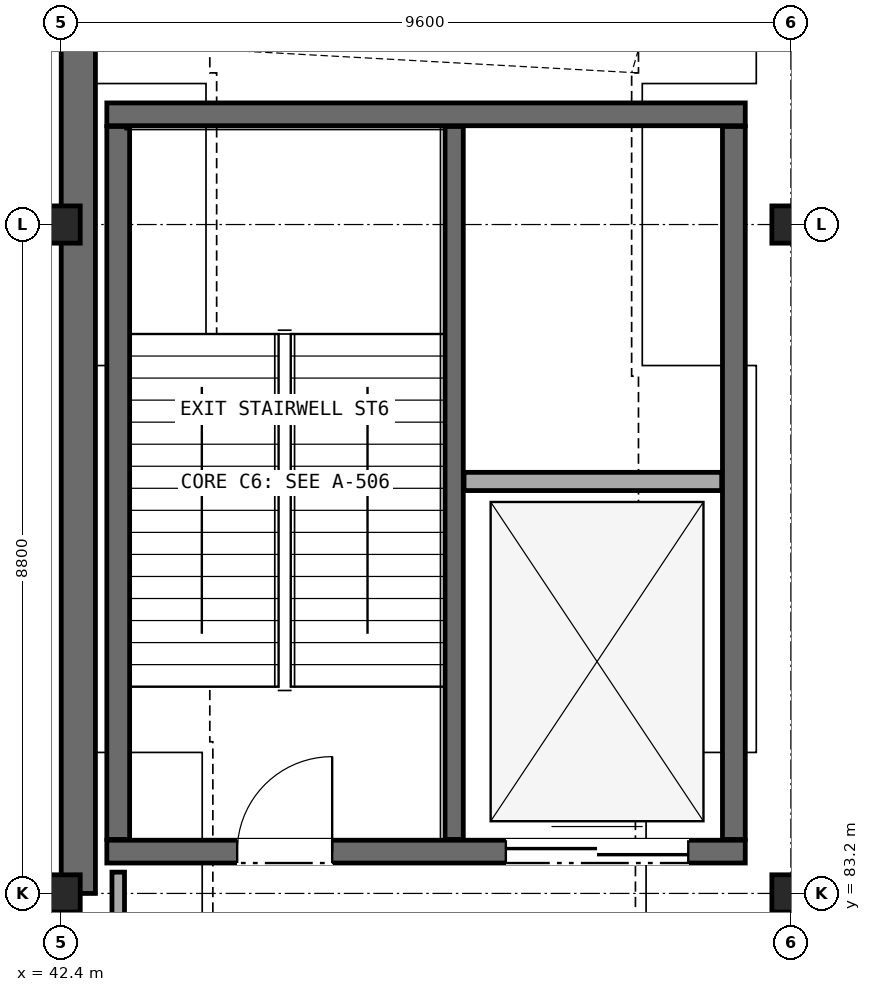
"""IFC4 building model, lengths in metres.
Left out: names, types, materials, properties, quantities, classifications, styles, units other than length and angle.
Written with IfcOpenShell. Run it as: python <this file> out.ifc"""

import sys

from ifc_helpers import new_model, si_unit, direction, frame, frame_2d, origin, origin_2d, place, context, subcontext, project, spatial, rectangle, i_section, extrude, element, fill, save


model = new_model("IFC4")
c1 = context("Model", 3, precision=1e-05, world=origin(), true_north=direction((0.0, 1.0)))
c2 = subcontext(c1, "Body", "Model", "MODEL_VIEW")
j1 = project(units=[si_unit("LENGTHUNIT", "METRE"), si_unit("PLANEANGLEUNIT", "RADIAN")], contexts=[c1])
p1 = place(None, origin())
s1 = spatial("IfcSite", under=j1, at=p1, CompositionType="ELEMENT")
p2 = place(p1, origin())
s2 = spatial("IfcBuilding", under=s1, at=p2, CompositionType="ELEMENT")
p3 = place(p2, frame((0.0, 0.0, -5.4)))
s3 = spatial("IfcBuildingStorey", under=s2, at=p3, CompositionType="ELEMENT", Elevation=-5.4)
for number, where, z_axis, x_axis in (
    (1, (42.4, 83.2, 0.0), (0.0, 0.0, 1.0), (1.0, 0.0, 0.0)),
    (2, (42.4, 92.0, 0.0), (0.0, 0.0, 1.0), (1.0, 0.0, 0.0)),
    (3, (52.0, 83.2, 0.0), (0.0, 0.0, 1.0), (1.0, 0.0, 0.0)),
    (4, (52.0, 92.0, 0.0), (0.0, 0.0, 1.0), (1.0, 0.0, 0.0)),
):
    element("IfcColumn", number, at=place(p3, frame(where, z_axis=z_axis, x_axis=x_axis)), inside=s3, PredefinedType="COLUMN", context=c2, shape_type="SweptSolid", body=[
        extrude(i_section(OverallWidth=0.5, OverallDepth=0.49, WebThickness=0.028, FlangeThickness=0.04, at=origin_2d()), origin(), (0.0, 0.0, 1.0), 5.4),
    ])
p4 = place(p3, frame((42.625, 114.969, 0.0), z_axis=(0.0, 0.0, 1.0), x_axis=(0.0, -1.0, 0.0)))
e5 = element("IfcWall", 5, at=p4, inside=s3, PredefinedType="USERDEFINED", context=c2, shape_type="SweptSolid", body=[
    extrude(rectangle(XDim=31.769, YDim=0.45, at=frame_2d((15.885, 0.0))), origin(), (0.0, 0.0, 1.0), 5.06),
])
p5 = place(p3, frame((42.4, 83.01, 0.0), z_axis=(0.0, 0.0, 1.0), x_axis=(-1.0, 0.0, 0.0)))
e6 = element("IfcWall", 6, at=p5, inside=s3, PredefinedType="USERDEFINED", context=c2, shape_type="SweptSolid", body=[
    extrude(rectangle(XDim=28.8, YDim=0.38, at=frame_2d((14.4, 0.0))), origin(), (0.0, 0.0, 1.0), 5.06),
])
p6 = place(p3, frame((43.0, 83.75, 0.0), z_axis=(0.0, 0.0, 1.0), x_axis=(1.0, 0.0, 0.0)))
e7 = element("IfcWall", 7, at=p6, inside=s3, PredefinedType="SHEAR", context=c2, shape_type="SweptSolid", body=[
    extrude(rectangle(XDim=8.4, YDim=0.3, at=frame_2d((4.2, 0.0))), origin(), (0.0, 0.0, 1.0), 5.085),
])
p7 = place(p6, frame((1.715, 0.0, 0.0)))
e8 = element("IfcOpeningElement", 8, at=p7, cuts=e7, PredefinedType="OPENING", context=c2, shape_type="SweptSolid", body=[
    extrude(rectangle(XDim=1.25, YDim=2.2, at=frame_2d((0.625, 1.1))), frame((0.0, 0.16, 0.0), z_axis=(0.0, -1.0, 0.0), x_axis=(1.0, 0.0, 0.0)), (0.0, 0.0, 1.0), 0.32),
])
p8 = place(p6, frame((5.25, 0.0, 0.0)))
e9 = element("IfcOpeningElement", 9, at=p8, cuts=e7, PredefinedType="OPENING", context=c2, shape_type="SweptSolid", body=[
    extrude(rectangle(XDim=2.4, YDim=2.55, at=frame_2d((1.2, 1.275))), frame((0.0, 0.16, 0.0), z_axis=(0.0, -1.0, 0.0), x_axis=(1.0, 0.0, 0.0)), (0.0, 0.0, 1.0), 0.32),
])
p9 = place(p3, frame((51.4, 93.45, 0.0), z_axis=(0.0, 0.0, 1.0), x_axis=(-1.0, 0.0, 0.0)))
e10 = element("IfcWall", 10, at=p9, inside=s3, PredefinedType="SHEAR", context=c2, shape_type="SweptSolid", body=[
    extrude(rectangle(XDim=8.4, YDim=0.3, at=frame_2d((4.2, 0.0))), origin(), (0.0, 0.0, 1.0), 5.085),
])
for number, where, z_axis, x_axis in (
    (11, (51.25, 83.91, 0.0), (0.0, 0.0, 1.0), (0.0, 1.0, 0.0)),
    (12, (43.15, 93.29, 0.0), (0.0, 0.0, 1.0), (0.0, -1.0, 0.0)),
):
    element("IfcWall", number, at=place(p3, frame(where, z_axis=z_axis, x_axis=x_axis)), inside=s3, PredefinedType="SHEAR", context=c2, shape_type="SweptSolid", body=[
        extrude(rectangle(XDim=9.38, YDim=0.3, at=frame_2d((4.69, 0.0))), origin(), (0.0, 0.0, 1.0), 5.085),
    ])
p10 = place(p3, frame((47.57, 83.91, 0.0), z_axis=(0.0, 0.0, 1.0), x_axis=(0.0, 1.0, 0.0)))
e13 = element("IfcWall", 13, at=p10, inside=s3, PredefinedType="SOLIDWALL", context=c2, shape_type="SweptSolid", body=[
    extrude(rectangle(XDim=9.38, YDim=0.24, at=frame_2d((4.69, 0.0))), origin(), (0.0, 0.0, 1.0), 5.085),
])
p11 = place(p3, frame((47.7, 88.62, 0.0), z_axis=(0.0, 0.0, 1.0), x_axis=(1.0, 0.0, 0.0)))
e14 = element("IfcWall", 14, at=p11, inside=s3, PredefinedType="SOLIDWALL", context=c2, shape_type="SweptSolid", body=[
    extrude(rectangle(XDim=3.39, YDim=0.24, at=frame_2d((1.695, 0.0))), origin(), (0.0, 0.0, 1.0), 5.085),
])
p12 = place(p3, frame((43.15, 83.48, 0.0), z_axis=(0.0, 0.0, 1.0), x_axis=(0.0, -1.0, 0.0)))
e15 = element("IfcWall", 15, at=p12, inside=s3, PredefinedType="PARTITIONING", context=c2, shape_type="SweptSolid", body=[
    extrude(rectangle(XDim=3.6, YDim=0.165, at=frame_2d((1.8, 0.0))), origin(), (0.0, 0.0, 1.0), 4.448),
])
p13 = place(p7, origin())
e16 = element("IfcDoor", 16, at=p13, inside=s3, OperationType="SINGLE_SWING_RIGHT", PredefinedType="DOOR", context=c2, shape_type="SweptSolid", body=[
    extrude(rectangle(XDim=1.25, YDim=2.2, at=frame_2d((0.625, 1.1))), frame((0.0, 0.025, 0.0), z_axis=(0.0, -1.0, 0.0), x_axis=(1.0, 0.0, 0.0)), (0.0, 0.0, 1.0), 0.05),
])
fill(e8, e16)
p14 = place(p8, origin())
e17 = element("IfcDoor", 17, at=p14, inside=s3, OperationType="DOUBLE_DOOR_SLIDING", PredefinedType="DOOR", context=c2, shape_type="SweptSolid", body=[
    extrude(rectangle(XDim=2.4, YDim=2.55, at=frame_2d((1.2, 1.275))), frame((0.0, 0.025, 0.0), z_axis=(0.0, -1.0, 0.0), x_axis=(1.0, 0.0, 0.0)), (0.0, 0.0, 1.0), 0.05),
])
fill(e9, e17)
save(model, sys.argv[1])
